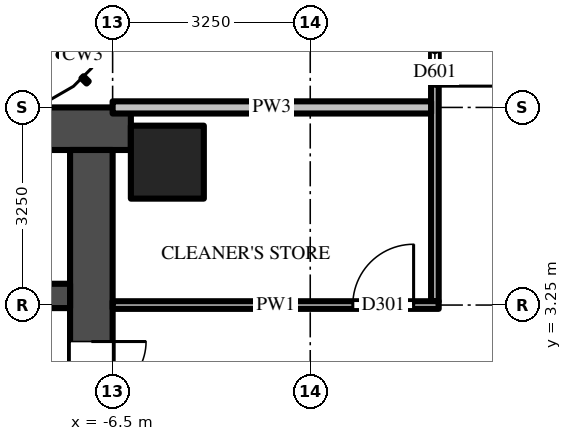
"""IFC4 building model, lengths in metres.
Left out: names, types, materials, properties, quantities, classifications, styles, units other than length and angle.
Written with IfcOpenShell. Run it as: python <this file> out.ifc"""

import sys

from ifc_helpers import new_model, si_unit, direction, frame, frame_2d, origin, origin_2d, place, context, subcontext, project, spatial, rectangle, extrude, source, transform, mapped, element, fill, save


model = new_model("IFC4")
c1 = context("Model", 3, precision=1e-05, world=origin(), true_north=direction((0.0, 1.0)))
c2 = subcontext(c1, "Body", "Model", "MODEL_VIEW")
j1 = project(units=[si_unit("LENGTHUNIT", "METRE"), si_unit("PLANEANGLEUNIT", "RADIAN")], contexts=[c1])
p1 = place(None, origin())
s1 = spatial("IfcSite", under=j1, at=p1, CompositionType="ELEMENT")
p2 = place(p1, origin())
s2 = spatial("IfcBuilding", under=s1, at=p2, CompositionType="ELEMENT")
p3 = place(p2, frame((0.0, 0.0, 181.5)))
s3 = spatial("IfcBuildingStorey", under=s2, at=p3, CompositionType="ELEMENT", Elevation=181.5)
m1 = source(origin(), c2, "Body", "SweptSolid", [
    extrude(rectangle(XDim=1.2, YDim=1.2, at=origin_2d()), origin(), (0.0, 0.0, 1.0), 3.9),
])
p4 = place(p3, frame((-5.6, 5.6, 0.0), z_axis=(0.0, 0.0, 1.0), x_axis=(1.0, 0.0, 0.0)))
e1 = element("IfcColumn", 1, at=p4, inside=s3, PredefinedType="COLUMN", context=c2, shape_type="MappedRepresentation", body=[
    mapped(m1, transform((0.0, 0.0, 0.0))),
])
m2 = source(origin(), c2, "Body", "SweptSolid", [
    extrude(rectangle(XDim=16.55, YDim=0.7, at=frame_2d((8.275, 0.0))), origin(), (0.0, 0.0, 1.0), 3.7),
])
p5 = place(p3, frame((-6.2, 6.15, 0.0), z_axis=(0.0, 0.0, 1.0), x_axis=(-1.0, 0.0, 0.0)))
e2 = element("IfcWall", 2, at=p5, inside=s3, PredefinedType="SHEAR", context=c2, shape_type="MappedRepresentation", body=[
    mapped(m2, transform((0.0, 0.0, 0.0))),
])
m3 = source(origin(), c2, "Body", "SweptSolid", [
    extrude(rectangle(XDim=9.05, YDim=0.7, at=frame_2d((4.525, 0.0))), origin(), (0.0, 0.0, 1.0), 3.7),
])
p6 = place(p3, frame((-6.85, 5.8, 0.0), z_axis=(0.0, 0.0, 1.0), x_axis=(0.0, -1.0, 0.0)))
e3 = element("IfcWall", 3, at=p6, inside=s3, PredefinedType="SHEAR", context=c2, shape_type="MappedRepresentation", body=[
    mapped(m3, transform((0.0, 0.0, 0.0))),
])
m4 = source(origin(), c2, "Body", "SweptSolid", [
    extrude(rectangle(XDim=1.8, YDim=2.1, at=frame_2d((0.9, 1.05))), frame((0.0, 0.36, 0.0), z_axis=(0.0, -1.0, 0.0), x_axis=(1.0, 0.0, 0.0)), (0.0, 0.0, 1.0), 0.72),
])
p7 = place(p6, frame((3.15, 0.0, 0.0)))
e4 = element("IfcOpeningElement", 4, at=p7, cuts=e3, PredefinedType="OPENING", context=c2, shape_type="MappedRepresentation", body=[
    mapped(m4, transform((0.0, 0.0, 0.0))),
])
m5 = source(origin(), c2, "Body", "SweptSolid", [
    extrude(rectangle(XDim=7.5, YDim=0.4, at=frame_2d((3.75, 0.0))), origin(), (0.0, 0.0, 1.0), 3.7),
])
p8 = place(p3, frame((-7.2, 3.4, 0.0), z_axis=(0.0, 0.0, 1.0), x_axis=(-1.0, 0.0, 0.0)))
e5 = element("IfcWall", 5, at=p8, inside=s3, PredefinedType="SHEAR", context=c2, shape_type="MappedRepresentation", body=[
    mapped(m5, transform((0.0, 0.0, 0.0))),
])
m6 = source(origin(), c2, "Body", "SweptSolid", [
    extrude(rectangle(XDim=1.0, YDim=2.1, at=frame_2d((0.5, 1.05))), frame((0.0, 0.21, 0.0), z_axis=(0.0, -1.0, 0.0), x_axis=(1.0, 0.0, 0.0)), (0.0, 0.0, 1.0), 0.42),
])
p9 = place(p8, frame((1.462, 0.0, 0.0)))
e6 = element("IfcOpeningElement", 6, at=p9, cuts=e5, PredefinedType="OPENING", context=c2, shape_type="MappedRepresentation", body=[
    mapped(m6, transform((0.0, 0.0, 0.0))),
])
m7 = source(origin(), c2, "Body", "SweptSolid", [
    extrude(rectangle(XDim=0.9, YDim=2.1, at=frame_2d((0.45, 1.05))), frame((0.0, 0.21, 0.0), z_axis=(0.0, -1.0, 0.0), x_axis=(1.0, 0.0, 0.0)), (0.0, 0.0, 1.0), 0.42),
])
p10 = place(p8, frame((4.45, 0.0, 0.0)))
e7 = element("IfcOpeningElement", 7, at=p10, cuts=e5, PredefinedType="OPENING", context=c2, shape_type="MappedRepresentation", body=[
    mapped(m7, transform((0.0, 0.0, 0.0))),
])
m8 = source(origin(), c2, "Body", "SweptSolid", [
    extrude(rectangle(XDim=0.8, YDim=2.1, at=frame_2d((0.4, 1.05))), frame((0.0, 0.21, 0.0), z_axis=(0.0, -1.0, 0.0), x_axis=(1.0, 0.0, 0.0)), (0.0, 0.0, 1.0), 0.42),
])
p11 = place(p8, frame((6.087, 0.0, 0.0)))
e8 = element("IfcOpeningElement", 8, at=p11, cuts=e5, PredefinedType="OPENING", context=c2, shape_type="MappedRepresentation", body=[
    mapped(m8, transform((0.0, 0.0, 0.0))),
])
m9 = source(origin(), c2, "Body", "SweptSolid", [
    extrude(rectangle(XDim=8.725, YDim=0.125, at=frame_2d((4.363, 0.0))), origin(), (0.0, 0.0, 1.0), 2.997),
])
p12 = place(p3, frame((-1.2, 12.038, 0.0), z_axis=(0.0, 0.0, 1.0), x_axis=(0.0, -1.0, 0.0)))
e9 = element("IfcWall", 9, at=p12, inside=s3, PredefinedType="PARTITIONING", context=c2, shape_type="MappedRepresentation", body=[
    mapped(m9, transform((0.0, 0.0, 0.0))),
])
m10 = source(origin(), c2, "Body", "SweptSolid", [
    extrude(rectangle(XDim=1.2, YDim=2.1, at=frame_2d((0.6, 1.05))), frame((0.0, 0.073, 0.0), z_axis=(0.0, -1.0, 0.0), x_axis=(1.0, 0.0, 0.0)), (0.0, 0.0, 1.0), 0.145),
])
p13 = place(p12, frame((3.988, 0.0, 0.0)))
e10 = element("IfcOpeningElement", 10, at=p13, cuts=e9, PredefinedType="OPENING", context=c2, shape_type="MappedRepresentation", body=[
    mapped(m10, transform((0.0, 0.0, 0.0))),
])
m11 = source(origin(), c2, "Body", "SweptSolid", [
    extrude(rectangle(XDim=5.363, YDim=0.125, at=frame_2d((2.681, 0.0))), origin(), (0.0, 0.0, 1.0), 2.997),
])
p14 = place(p3, frame((-6.5, 3.25, 0.0), z_axis=(0.0, 0.0, 1.0), x_axis=(1.0, 0.0, 0.0)))
e11 = element("IfcWall", 11, at=p14, inside=s3, PredefinedType="PARTITIONING", context=c2, shape_type="MappedRepresentation", body=[
    mapped(m11, transform((0.0, 0.0, 0.0))),
])
m12 = source(origin(), c2, "Body", "SweptSolid", [
    extrude(rectangle(XDim=1.0, YDim=2.1, at=frame_2d((0.5, 1.05))), frame((0.0, 0.073, 0.0), z_axis=(0.0, -1.0, 0.0), x_axis=(1.0, 0.0, 0.0)), (0.0, 0.0, 1.0), 0.145),
])
p15 = place(p14, frame((3.95, 0.0, 0.0)))
e12 = element("IfcOpeningElement", 12, at=p15, cuts=e11, PredefinedType="OPENING", context=c2, shape_type="MappedRepresentation", body=[
    mapped(m12, transform((0.0, 0.0, 0.0))),
])
m13 = source(origin(), c2, "Body", "SweptSolid", [
    extrude(rectangle(XDim=5.238, YDim=0.2, at=frame_2d((2.619, 0.0))), origin(), (0.0, 0.0, 1.0), 2.78),
])
p16 = place(p3, frame((-6.5, 6.5, 0.0), z_axis=(0.0, 0.0, 1.0), x_axis=(1.0, 0.0, 0.0)))
e13 = element("IfcWall", 13, at=p16, inside=s3, PredefinedType="PARTITIONING", context=c2, shape_type="MappedRepresentation", body=[
    mapped(m13, transform((0.0, 0.0, 0.0))),
])
m14 = source(origin(), c2, "Body", "SweptSolid", [
    extrude(rectangle(XDim=1.8, YDim=2.1, at=frame_2d((0.9, 1.05))), frame((0.0, -0.275, 0.0), z_axis=(0.0, -1.0, 0.0), x_axis=(1.0, 0.0, 0.0)), (0.0, 0.0, 1.0), 0.05),
])
p17 = place(p7, origin())
e14 = element("IfcDoor", 14, at=p17, inside=s3, OperationType="DOUBLE_DOOR_SINGLE_SWING", PredefinedType="DOOR", context=c2, shape_type="MappedRepresentation", body=[
    mapped(m14, transform((0.0, 0.0, 0.0))),
])
fill(e4, e14)
m15 = source(origin(), c2, "Body", "SweptSolid", [
    extrude(rectangle(XDim=1.0, YDim=2.1, at=frame_2d((0.5, 1.05))), frame((0.0, 0.025, 0.0), z_axis=(0.0, -1.0, 0.0), x_axis=(1.0, 0.0, 0.0)), (0.0, 0.0, 1.0), 0.05),
])
p18 = place(p15, origin())
e15 = element("IfcDoor", 15, at=p18, inside=s3, OperationType="SINGLE_SWING_RIGHT", PredefinedType="DOOR", context=c2, shape_type="MappedRepresentation", body=[
    mapped(m15, transform((0.0, 0.0, 0.0))),
])
fill(e12, e15)
m16 = source(origin(), c2, "Body", "SweptSolid", [
    extrude(rectangle(XDim=1.2, YDim=2.1, at=frame_2d((0.6, 1.05))), frame((0.0, 0.025, 0.0), z_axis=(0.0, -1.0, 0.0), x_axis=(1.0, 0.0, 0.0)), (0.0, 0.0, 1.0), 0.05),
])
p19 = place(p13, origin())
e16 = element("IfcDoor", 16, at=p19, inside=s3, OperationType="SINGLE_SWING_RIGHT", PredefinedType="DOOR", context=c2, shape_type="MappedRepresentation", body=[
    mapped(m16, transform((0.0, 0.0, 0.0))),
])
fill(e10, e16)
save(model, sys.argv[1])
